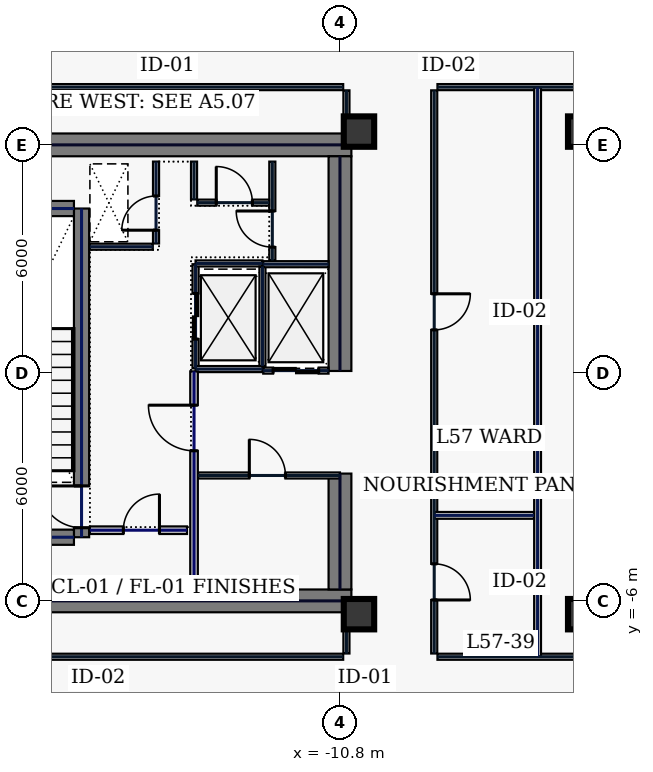
"""IFC4 building model, lengths in metres.
Left out: names, types, materials, properties, quantities, classifications, styles, units other than length and angle.
Written with IfcOpenShell. Run it as: python <this file> out.ifc"""

import sys

from ifc_helpers import new_model, si_unit, direction, frame, frame_2d, origin, origin_2d, place, context, subcontext, project, spatial, rectangle, hollow_rectangle, extrude, element, fill, save


model = new_model("IFC4")
c1 = context("Model", 3, precision=1e-05, world=origin(), true_north=direction((0.0, 1.0)))
c2 = subcontext(c1, "Body", "Model", "MODEL_VIEW")
j1 = project(units=[si_unit("LENGTHUNIT", "METRE"), si_unit("PLANEANGLEUNIT", "RADIAN")], contexts=[c1])
p1 = place(None, origin())
s1 = spatial("IfcSite", under=j1, at=p1, CompositionType="ELEMENT")
p2 = place(p1, origin())
s2 = spatial("IfcBuilding", under=s1, at=p2, CompositionType="ELEMENT")
p3 = place(p2, frame((0.0, 0.0, 247.0)))
s3 = spatial("IfcBuildingStorey", under=s2, at=p3, CompositionType="ELEMENT", Elevation=247.0)
for number, where, z_axis, x_axis in (
    (1, (-22.0, 6.0, 0.0), (0.0, 0.0, 1.0), (1.0, 0.0, 0.0)),
    (2, (-22.0, -6.0, 0.0), (0.0, 0.0, 1.0), (1.0, 0.0, 0.0)),
):
    element("IfcWall", number, at=place(p3, frame(where, z_axis=z_axis, x_axis=x_axis)), inside=s3, PredefinedType="SHEAR", context=c2, shape_type="SweptSolid", body=[
        extrude(rectangle(XDim=11.5, YDim=0.6, at=frame_2d((5.75, 0.0))), origin(), (0.0, 0.0, 1.0), 3.74),
    ])
p4 = place(p3, frame((-10.8, -5.7, 0.0), z_axis=(0.0, 0.0, 1.0), x_axis=(0.0, 1.0, 0.0)))
e3 = element("IfcWall", 3, at=p4, inside=s3, PredefinedType="SHEAR", context=c2, shape_type="SweptSolid", body=[
    extrude(rectangle(XDim=3.05, YDim=0.6, at=frame_2d((1.525, 0.0))), origin(), (0.0, 0.0, 1.0), 3.74),
])
p5 = place(p3, frame((-10.8, 0.05, 0.0), z_axis=(0.0, 0.0, 1.0), x_axis=(0.0, 1.0, 0.0)))
e4 = element("IfcWall", 4, at=p5, inside=s3, PredefinedType="SHEAR", context=c2, shape_type="SweptSolid", body=[
    extrude(rectangle(XDim=5.65, YDim=0.6, at=frame_2d((2.825, 0.0))), origin(), (0.0, 0.0, 1.0), 3.74),
])
p6 = place(p3, frame((-17.6, -4.325, 0.0), z_axis=(0.0, 0.0, 1.0), x_axis=(0.0, 1.0, 0.0)))
e5 = element("IfcWall", 5, at=p6, inside=s3, PredefinedType="SHEAR", context=c2, shape_type="SweptSolid", body=[
    extrude(rectangle(XDim=8.65, YDim=0.4, at=frame_2d((4.325, 0.0))), origin(), (0.0, 0.0, 1.0), 3.74),
])
p7 = place(p6, frame((0.25, 0.0, 0.0)))
e6 = element("IfcOpeningElement", 6, at=p7, cuts=e5, PredefinedType="OPENING", context=c2, shape_type="SweptSolid", body=[
    extrude(rectangle(XDim=1.1, YDim=2.2, at=frame_2d((0.55, 1.1))), frame((0.0, 0.21, 0.0), z_axis=(0.0, -1.0, 0.0), x_axis=(1.0, 0.0, 0.0)), (0.0, 0.0, 1.0), 0.42),
])
for number, where, z_axis, x_axis in (
    (7, (-21.2, -4.325, 0.0), (0.0, 0.0, 1.0), (1.0, 0.0, 0.0)),
    (8, (-21.2, 4.325, 0.0), (0.0, 0.0, 1.0), (1.0, 0.0, 0.0)),
):
    element("IfcWall", number, at=place(p3, frame(where, z_axis=z_axis, x_axis=x_axis)), inside=s3, PredefinedType="SHEAR", context=c2, shape_type="SweptSolid", body=[
        extrude(rectangle(XDim=3.4, YDim=0.4, at=frame_2d((1.7, 0.0))), origin(), (0.0, 0.0, 1.0), 3.74),
    ])
for number, where, z_axis, x_axis in (
    (9, (-10.3, -6.35, 0.0), (0.0, 0.0, 1.0), (1.0, 0.0, 0.0)),
    (10, (-10.3, 6.35, 0.0), (0.0, 0.0, 1.0), (1.0, 0.0, 0.0)),
    (11, (-4.4, -6.35, 0.0), (0.0, 0.0, 1.0), (1.0, 0.0, 0.0)),
    (12, (-4.4, 6.35, 0.0), (0.0, 0.0, 1.0), (1.0, 0.0, 0.0)),
):
    element("IfcColumn", number, at=place(p3, frame(where, z_axis=z_axis, x_axis=x_axis)), inside=s3, PredefinedType="COLUMN", context=c2, shape_type="SweptSolid", body=[
        extrude(hollow_rectangle(XDim=0.8, YDim=0.8, WallThickness=0.036, at=origin_2d()), origin(), (0.0, 0.0, 1.0), 3.74),
    ])
p8 = place(p3, frame((-14.6, 0.12, 0.0), z_axis=(0.0, 0.0, 1.0), x_axis=(0.0, 1.0, 0.0)))
e13 = element("IfcWall", 13, at=p8, inside=s3, PredefinedType="PARTITIONING", context=c2, shape_type="SweptSolid", body=[
    extrude(rectangle(XDim=2.74, YDim=0.16, at=frame_2d((1.37, 0.0))), origin(), (0.0, 0.0, 1.0), 3.74),
])
p9 = place(p8, frame((0.77, 0.0, 0.0)))
e14 = element("IfcOpeningElement", 14, at=p9, cuts=e13, PredefinedType="OPENING", context=c2, shape_type="SweptSolid", body=[
    extrude(rectangle(XDim=1.2, YDim=2.2, at=frame_2d((0.6, 1.1))), frame((0.0, 0.09, 0.0), z_axis=(0.0, -1.0, 0.0), x_axis=(1.0, 0.0, 0.0)), (0.0, 0.0, 1.0), 0.18),
])
for number, where, z_axis, x_axis in (
    (15, (-14.6, 0.1, 0.0), (0.0, 0.0, 1.0), (1.0, 0.0, 0.0)),
    (16, (-14.6, 2.88, 0.0), (0.0, 0.0, 1.0), (1.0, 0.0, 0.0)),
):
    element("IfcWall", number, at=place(p3, frame(where, z_axis=z_axis, x_axis=x_axis)), inside=s3, PredefinedType="PARTITIONING", context=c2, shape_type="SweptSolid", body=[
        extrude(rectangle(XDim=1.76, YDim=0.16, at=frame_2d((0.88, 0.0))), origin(), (0.0, 0.0, 1.0), 3.74),
    ])
p10 = place(p3, frame((-12.84, 0.18, 0.0), z_axis=(0.0, 0.0, 1.0), x_axis=(0.0, 1.0, 0.0)))
e17 = element("IfcWall", 17, at=p10, inside=s3, PredefinedType="PARTITIONING", context=c2, shape_type="SweptSolid", body=[
    extrude(rectangle(XDim=2.62, YDim=0.16, at=frame_2d((1.31, 0.0))), origin(), (0.0, 0.0, 1.0), 3.74),
])
p11 = place(p3, frame((-12.82, 0.06, 0.0), z_axis=(0.0, 0.0, 1.0), x_axis=(1.0, 0.0, 0.0)))
e18 = element("IfcWall", 18, at=p11, inside=s3, PredefinedType="PARTITIONING", context=c2, shape_type="SweptSolid", body=[
    extrude(rectangle(XDim=1.72, YDim=0.16, at=frame_2d((0.86, 0.0))), origin(), (0.0, 0.0, 1.0), 3.74),
])
p12 = place(p11, frame((0.26, 0.0, 0.0)))
e19 = element("IfcOpeningElement", 19, at=p12, cuts=e18, PredefinedType="OPENING", context=c2, shape_type="SweptSolid", body=[
    extrude(rectangle(XDim=1.2, YDim=2.2, at=frame_2d((0.6, 1.1))), frame((0.0, 0.09, 0.0), z_axis=(0.0, -1.0, 0.0), x_axis=(1.0, 0.0, 0.0)), (0.0, 0.0, 1.0), 0.18),
])
p13 = place(p3, frame((-12.82, 2.86, 0.0), z_axis=(0.0, 0.0, 1.0), x_axis=(1.0, 0.0, 0.0)))
e20 = element("IfcWall", 20, at=p13, inside=s3, PredefinedType="PARTITIONING", context=c2, shape_type="SweptSolid", body=[
    extrude(rectangle(XDim=1.72, YDim=0.16, at=frame_2d((0.86, 0.0))), origin(), (0.0, 0.0, 1.0), 3.74),
])
p14 = place(p3, frame((-15.64, 3.405, 0.0), z_axis=(0.0, 0.0, 1.0), x_axis=(0.0, 1.0, 0.0)))
e21 = element("IfcWall", 21, at=p14, inside=s3, PredefinedType="PARTITIONING", context=c2, shape_type="SweptSolid", body=[
    extrude(rectangle(XDim=2.155, YDim=0.16, at=frame_2d((1.078, 0.0))), origin(), (0.0, 0.0, 1.0), 3.74),
])
p15 = place(p14, frame((0.35, 0.0, 0.0)))
e22 = element("IfcOpeningElement", 22, at=p15, cuts=e21, PredefinedType="OPENING", context=c2, shape_type="SweptSolid", body=[
    extrude(rectangle(XDim=0.9, YDim=2.2, at=frame_2d((0.45, 1.1))), frame((0.0, 0.09, 0.0), z_axis=(0.0, -1.0, 0.0), x_axis=(1.0, 0.0, 0.0)), (0.0, 0.0, 1.0), 0.18),
])
p16 = place(p3, frame((-17.38, 3.32, 0.0), z_axis=(0.0, 0.0, 1.0), x_axis=(1.0, 0.0, 0.0)))
e23 = element("IfcWall", 23, at=p16, inside=s3, PredefinedType="PARTITIONING", context=c2, shape_type="SweptSolid", body=[
    extrude(rectangle(XDim=1.655, YDim=0.16, at=frame_2d((0.827, 0.0))), origin(), (0.0, 0.0, 1.0), 3.74),
])
p17 = place(p3, frame((-17.38, -4.14, 0.0), z_axis=(0.0, 0.0, 1.0), x_axis=(1.0, 0.0, 0.0)))
e24 = element("IfcWall", 24, at=p17, inside=s3, PredefinedType="SOLIDWALL", context=c2, shape_type="SweptSolid", body=[
    extrude(rectangle(XDim=2.555, YDim=0.2, at=frame_2d((1.277, 0.0))), origin(), (0.0, 0.0, 1.0), 3.74),
])
p18 = place(p17, frame((0.88, 0.0, 0.0)))
e25 = element("IfcOpeningElement", 25, at=p18, cuts=e24, PredefinedType="OPENING", context=c2, shape_type="SweptSolid", body=[
    extrude(rectangle(XDim=0.95, YDim=2.2, at=frame_2d((0.475, 1.1))), frame((0.0, 0.11, 0.0), z_axis=(0.0, -1.0, 0.0), x_axis=(1.0, 0.0, 0.0)), (0.0, 0.0, 1.0), 0.22),
])
p19 = place(p3, frame((-14.535, -2.7, 0.0), z_axis=(0.0, 0.0, 1.0), x_axis=(1.0, 0.0, 0.0)))
e26 = element("IfcWall", 26, at=p19, inside=s3, PredefinedType="PARTITIONING", context=c2, shape_type="SweptSolid", body=[
    extrude(rectangle(XDim=3.735, YDim=0.16, at=frame_2d((1.867, 0.0))), origin(), (0.0, 0.0, 1.0), 3.74),
])
p20 = place(p19, frame((1.35, 0.0, 0.0)))
e27 = element("IfcOpeningElement", 27, at=p20, cuts=e26, PredefinedType="OPENING", context=c2, shape_type="SweptSolid", body=[
    extrude(rectangle(XDim=0.95, YDim=2.2, at=frame_2d((0.475, 1.1))), frame((0.0, 0.09, 0.0), z_axis=(0.0, -1.0, 0.0), x_axis=(1.0, 0.0, 0.0)), (0.0, 0.0, 1.0), 0.18),
])
p21 = place(p3, frame((-12.58, 2.96, 0.0), z_axis=(0.0, 0.0, 1.0), x_axis=(0.0, 1.0, 0.0)))
e28 = element("IfcWall", 28, at=p21, inside=s3, PredefinedType="PARTITIONING", context=c2, shape_type="SweptSolid", body=[
    extrude(rectangle(XDim=2.6, YDim=0.16, at=frame_2d((1.3, 0.0))), origin(), (0.0, 0.0, 1.0), 3.74),
])
p22 = place(p21, frame((0.35, 0.0, 0.0)))
e29 = element("IfcOpeningElement", 29, at=p22, cuts=e28, PredefinedType="OPENING", context=c2, shape_type="SweptSolid", body=[
    extrude(rectangle(XDim=0.95, YDim=2.2, at=frame_2d((0.475, 1.1))), frame((0.0, 0.09, 0.0), z_axis=(0.0, -1.0, 0.0), x_axis=(1.0, 0.0, 0.0)), (0.0, 0.0, 1.0), 0.18),
])
p23 = place(p3, frame((-14.555, 4.48, 0.0), z_axis=(0.0, 0.0, 1.0), x_axis=(1.0, 0.0, 0.0)))
e30 = element("IfcWall", 30, at=p23, inside=s3, PredefinedType="PARTITIONING", context=c2, shape_type="SweptSolid", body=[
    extrude(rectangle(XDim=1.89, YDim=0.16, at=frame_2d((0.945, 0.0))), origin(), (0.0, 0.0, 1.0), 3.74),
])
p24 = place(p23, frame((0.5, 0.0, 0.0)))
e31 = element("IfcOpeningElement", 31, at=p24, cuts=e30, PredefinedType="OPENING", context=c2, shape_type="SweptSolid", body=[
    extrude(rectangle(XDim=0.95, YDim=2.2, at=frame_2d((0.475, 1.1))), frame((0.0, 0.09, 0.0), z_axis=(0.0, -1.0, 0.0), x_axis=(1.0, 0.0, 0.0)), (0.0, 0.0, 1.0), 0.18),
])
p25 = place(p3, frame((-14.64, 4.565, 0.0), z_axis=(0.0, 0.0, 1.0), x_axis=(0.0, 1.0, 0.0)))
e32 = element("IfcWall", 32, at=p25, inside=s3, PredefinedType="PARTITIONING", context=c2, shape_type="SweptSolid", body=[
    extrude(rectangle(XDim=0.995, YDim=0.16, at=frame_2d((0.498, 0.0))), origin(), (0.0, 0.0, 1.0), 3.74),
])
p26 = place(p3, frame((-14.64, -5.56, 0.0), z_axis=(0.0, 0.0, 1.0), x_axis=(0.0, 1.0, 0.0)))
e33 = element("IfcWall", 33, at=p26, inside=s3, PredefinedType="SOLIDWALL", context=c2, shape_type="SweptSolid", body=[
    extrude(rectangle(XDim=5.6, YDim=0.2, at=frame_2d((2.8, 0.0))), origin(), (0.0, 0.0, 1.0), 3.74),
])
p27 = place(p26, frame((3.51, 0.0, 0.0)))
e34 = element("IfcOpeningElement", 34, at=p27, cuts=e33, PredefinedType="OPENING", context=c2, shape_type="SweptSolid", body=[
    extrude(rectangle(XDim=1.2, YDim=2.2, at=frame_2d((0.6, 1.1))), frame((0.0, 0.11, 0.0), z_axis=(0.0, -1.0, 0.0), x_axis=(1.0, 0.0, 0.0)), (0.0, 0.0, 1.0), 0.22),
])
p28 = place(p3, frame((-3.965, 7.52, 0.0), z_axis=(0.0, 0.0, 1.0), x_axis=(-1.0, 0.0, 0.0)))
e35 = element("IfcWall", 35, at=p28, inside=s3, PredefinedType="PARTITIONING", context=c2, shape_type="SweptSolid", body=[
    extrude(rectangle(XDim=4.27, YDim=0.16, at=frame_2d((2.135, 0.0))), origin(), (0.0, 0.0, 1.0), 3.74),
])
p29 = place(p3, frame((-8.32, 7.435, 0.0), z_axis=(0.0, 0.0, 1.0), x_axis=(0.0, -1.0, 0.0)))
e36 = element("IfcWall", 36, at=p29, inside=s3, PredefinedType="PARTITIONING", context=c2, shape_type="SweptSolid", body=[
    extrude(rectangle(XDim=14.82, YDim=0.16, at=frame_2d((7.41, 0.0))), origin(), (0.0, 0.0, 1.0), 3.74),
])
p30 = place(p29, frame((12.461, 0.0, 0.0)))
e37 = element("IfcOpeningElement", 37, at=p30, cuts=e36, PredefinedType="OPENING", context=c2, shape_type="SweptSolid", body=[
    extrude(rectangle(XDim=0.95, YDim=2.2, at=frame_2d((0.475, 1.1))), frame((0.0, 0.09, 0.0), z_axis=(0.0, -1.0, 0.0), x_axis=(1.0, 0.0, 0.0)), (0.0, 0.0, 1.0), 0.18),
])
p31 = place(p29, frame((5.354, 0.0, 0.0)))
e38 = element("IfcOpeningElement", 38, at=p31, cuts=e36, PredefinedType="OPENING", context=c2, shape_type="SweptSolid", body=[
    extrude(rectangle(XDim=0.95, YDim=2.2, at=frame_2d((0.475, 1.1))), frame((0.0, 0.09, 0.0), z_axis=(0.0, -1.0, 0.0), x_axis=(1.0, 0.0, 0.0)), (0.0, 0.0, 1.0), 0.18),
])
p32 = place(p3, frame((-8.235, -7.47, 0.0), z_axis=(0.0, 0.0, 1.0), x_axis=(1.0, 0.0, 0.0)))
e39 = element("IfcWall", 39, at=p32, inside=s3, PredefinedType="PARTITIONING", context=c2, shape_type="SweptSolid", body=[
    extrude(rectangle(XDim=4.27, YDim=0.16, at=frame_2d((2.135, 0.0))), origin(), (0.0, 0.0, 1.0), 3.74),
])
p33 = place(p3, frame((-10.63, -7.385, 0.0), z_axis=(0.0, 0.0, 1.0), x_axis=(0.0, 1.0, 0.0)))
e40 = element("IfcWall", 40, at=p33, inside=s3, PredefinedType="PARTITIONING", context=c2, shape_type="SweptSolid", body=[
    extrude(rectangle(XDim=0.965, YDim=0.16, at=frame_2d((0.482, 0.0))), origin(), (0.0, 0.0, 1.0), 3.74),
])
p34 = place(p3, frame((-10.63, 6.42, 0.0), z_axis=(0.0, 0.0, 1.0), x_axis=(0.0, 1.0, 0.0)))
e41 = element("IfcWall", 41, at=p34, inside=s3, PredefinedType="PARTITIONING", context=c2, shape_type="SweptSolid", body=[
    extrude(rectangle(XDim=1.015, YDim=0.16, at=frame_2d((0.508, 0.0))), origin(), (0.0, 0.0, 1.0), 3.74),
])
for number, where, z_axis, x_axis in (
    (42, (-10.715, 7.52, 0.0), (0.0, 0.0, 1.0), (-1.0, 0.0, 0.0)),
    (43, (-22.585, -7.47, 0.0), (0.0, 0.0, 1.0), (1.0, 0.0, 0.0)),
):
    element("IfcWall", number, at=place(p3, frame(where, z_axis=z_axis, x_axis=x_axis)), inside=s3, PredefinedType="PARTITIONING", context=c2, shape_type="SweptSolid", body=[
        extrude(rectangle(XDim=11.87, YDim=0.16, at=frame_2d((5.935, 0.0))), origin(), (0.0, 0.0, 1.0), 3.74),
    ])
p35 = place(p3, frame((-5.6, -7.465, 0.0), z_axis=(0.0, 0.0, 1.0), x_axis=(0.0, 1.0, 0.0)))
e44 = element("IfcWall", 44, at=p35, inside=s3, PredefinedType="PARTITIONING", context=c2, shape_type="SweptSolid", body=[
    extrude(rectangle(XDim=14.98, YDim=0.18, at=frame_2d((7.49, 0.0))), origin(), (0.0, 0.0, 1.0), 3.74),
])
p36 = place(p3, frame((-8.315, -3.75, 0.0), z_axis=(0.0, 0.0, 1.0), x_axis=(1.0, 0.0, 0.0)))
e45 = element("IfcWall", 45, at=p36, inside=s3, PredefinedType="PARTITIONING", context=c2, shape_type="SweptSolid", body=[
    extrude(rectangle(XDim=2.62, YDim=0.18, at=frame_2d((1.31, 0.0))), origin(), (0.0, 0.0, 1.0), 3.74),
])
p37 = place(p7, origin())
e46 = element("IfcDoor", 46, at=p37, inside=s3, OperationType="SINGLE_SWING_RIGHT", PredefinedType="DOOR", context=c2, shape_type="SweptSolid", body=[
    extrude(rectangle(XDim=1.1, YDim=2.2, at=frame_2d((0.55, 1.1))), frame((0.0, 0.025, 0.0), z_axis=(0.0, -1.0, 0.0), x_axis=(1.0, 0.0, 0.0)), (0.0, 0.0, 1.0), 0.05),
])
fill(e6, e46)
p38 = place(p9, origin())
e47 = element("IfcDoor", 47, at=p38, inside=s3, OperationType="SLIDING_TO_LEFT", PredefinedType="DOOR", context=c2, shape_type="SweptSolid", body=[
    extrude(rectangle(XDim=1.2, YDim=2.2, at=frame_2d((0.6, 1.1))), frame((0.0, 0.025, 0.0), z_axis=(0.0, -1.0, 0.0), x_axis=(1.0, 0.0, 0.0)), (0.0, 0.0, 1.0), 0.05),
])
fill(e14, e47)
p39 = place(p12, origin())
e48 = element("IfcDoor", 48, at=p39, inside=s3, OperationType="SLIDING_TO_LEFT", PredefinedType="DOOR", context=c2, shape_type="SweptSolid", body=[
    extrude(rectangle(XDim=1.2, YDim=2.2, at=frame_2d((0.6, 1.1))), frame((0.0, 0.025, 0.0), z_axis=(0.0, -1.0, 0.0), x_axis=(1.0, 0.0, 0.0)), (0.0, 0.0, 1.0), 0.05),
])
fill(e19, e48)
p40 = place(p15, origin())
e49 = element("IfcDoor", 49, at=p40, inside=s3, OperationType="SINGLE_SWING_LEFT", PredefinedType="DOOR", context=c2, shape_type="SweptSolid", body=[
    extrude(rectangle(XDim=0.9, YDim=2.2, at=frame_2d((0.45, 1.1))), frame((0.0, 0.025, 0.0), z_axis=(0.0, -1.0, 0.0), x_axis=(1.0, 0.0, 0.0)), (0.0, 0.0, 1.0), 0.05),
])
fill(e22, e49)
p41 = place(p18, origin())
e50 = element("IfcDoor", 50, at=p41, inside=s3, OperationType="SINGLE_SWING_RIGHT", PredefinedType="DOOR", context=c2, shape_type="SweptSolid", body=[
    extrude(rectangle(XDim=0.95, YDim=2.2, at=frame_2d((0.475, 1.1))), frame((0.0, 0.025, 0.0), z_axis=(0.0, -1.0, 0.0), x_axis=(1.0, 0.0, 0.0)), (0.0, 0.0, 1.0), 0.05),
])
fill(e25, e50)
p42 = place(p20, origin())
e51 = element("IfcDoor", 51, at=p42, inside=s3, OperationType="SINGLE_SWING_LEFT", PredefinedType="DOOR", context=c2, shape_type="SweptSolid", body=[
    extrude(rectangle(XDim=0.95, YDim=2.2, at=frame_2d((0.475, 1.1))), frame((0.0, 0.025, 0.0), z_axis=(0.0, -1.0, 0.0), x_axis=(1.0, 0.0, 0.0)), (0.0, 0.0, 1.0), 0.05),
])
fill(e27, e51)
p43 = place(p22, origin())
e52 = element("IfcDoor", 52, at=p43, inside=s3, OperationType="SINGLE_SWING_RIGHT", PredefinedType="DOOR", context=c2, shape_type="SweptSolid", body=[
    extrude(rectangle(XDim=0.95, YDim=2.2, at=frame_2d((0.475, 1.1))), frame((0.0, 0.025, 0.0), z_axis=(0.0, -1.0, 0.0), x_axis=(1.0, 0.0, 0.0)), (0.0, 0.0, 1.0), 0.05),
])
fill(e29, e52)
p44 = place(p24, origin())
e53 = element("IfcDoor", 53, at=p44, inside=s3, OperationType="SINGLE_SWING_LEFT", PredefinedType="DOOR", context=c2, shape_type="SweptSolid", body=[
    extrude(rectangle(XDim=0.95, YDim=2.2, at=frame_2d((0.475, 1.1))), frame((0.0, 0.025, 0.0), z_axis=(0.0, -1.0, 0.0), x_axis=(1.0, 0.0, 0.0)), (0.0, 0.0, 1.0), 0.05),
])
fill(e31, e53)
p45 = place(p27, origin())
e54 = element("IfcDoor", 54, at=p45, inside=s3, OperationType="SINGLE_SWING_RIGHT", PredefinedType="DOOR", context=c2, shape_type="SweptSolid", body=[
    extrude(rectangle(XDim=1.2, YDim=2.2, at=frame_2d((0.6, 1.1))), frame((0.0, 0.025, 0.0), z_axis=(0.0, -1.0, 0.0), x_axis=(1.0, 0.0, 0.0)), (0.0, 0.0, 1.0), 0.05),
])
fill(e34, e54)
p46 = place(p30, origin())
e55 = element("IfcDoor", 55, at=p46, inside=s3, OperationType="SINGLE_SWING_RIGHT", PredefinedType="DOOR", context=c2, shape_type="SweptSolid", body=[
    extrude(rectangle(XDim=0.95, YDim=2.2, at=frame_2d((0.475, 1.1))), frame((0.0, 0.025, 0.0), z_axis=(0.0, -1.0, 0.0), x_axis=(1.0, 0.0, 0.0)), (0.0, 0.0, 1.0), 0.05),
])
fill(e37, e55)
p47 = place(p31, origin())
e56 = element("IfcDoor", 56, at=p47, inside=s3, OperationType="SINGLE_SWING_LEFT", PredefinedType="DOOR", context=c2, shape_type="SweptSolid", body=[
    extrude(rectangle(XDim=0.95, YDim=2.2, at=frame_2d((0.475, 1.1))), frame((0.0, 0.025, 0.0), z_axis=(0.0, -1.0, 0.0), x_axis=(1.0, 0.0, 0.0)), (0.0, 0.0, 1.0), 0.05),
])
fill(e38, e56)
save(model, sys.argv[1])
